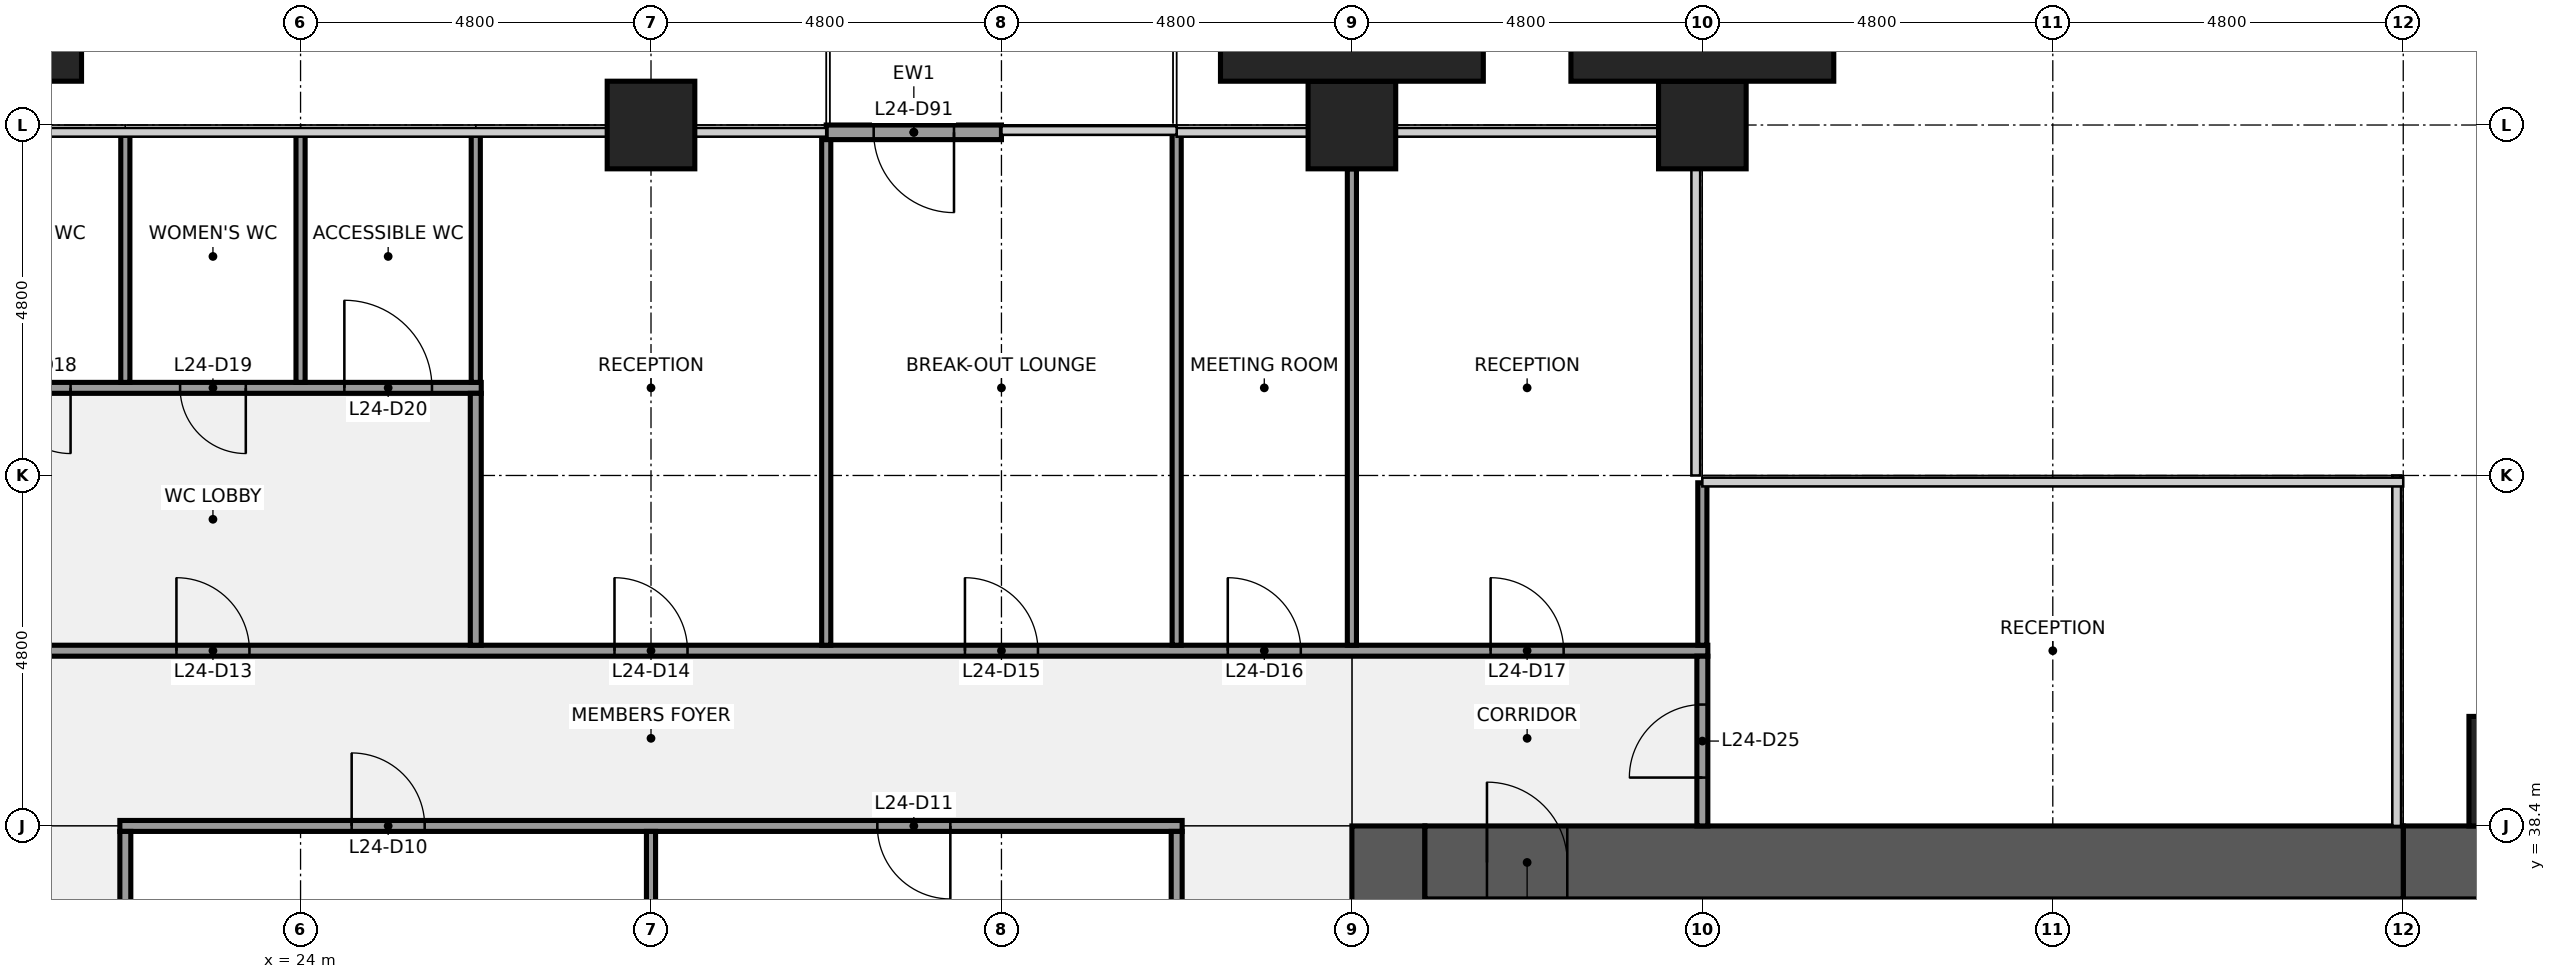
"""IFC4 building model, lengths in metres.
Left out: names, types, materials, properties, quantities, classifications, styles, units other than length and angle.
Written with IfcOpenShell. Run it as: python <this file> out.ifc"""

import sys

from ifc_helpers import new_model, si_unit, direction, frame, frame_2d, origin, origin_2d, place, context, subcontext, project, spatial, rectangle, extrude, element, fill, save


model = new_model("IFC4")
c1 = context("Model", 3, precision=1e-05, world=origin(), true_north=direction((0.0, 1.0)))
c2 = subcontext(c1, "Body", "Model", "MODEL_VIEW")
j1 = project(units=[si_unit("LENGTHUNIT", "METRE"), si_unit("PLANEANGLEUNIT", "RADIAN")], contexts=[c1])
p1 = place(None, origin())
s1 = spatial("IfcSite", under=j1, at=p1, CompositionType="ELEMENT")
p2 = place(p1, origin())
s2 = spatial("IfcBuilding", under=s1, at=p2, CompositionType="ELEMENT")
p3 = place(p2, frame((0.0, 0.0, 116.1)))
s3 = spatial("IfcBuildingStorey", under=s2, at=p3, CompositionType="ELEMENT", Elevation=116.1)
for number, where, z_axis, x_axis in (
    (1, (28.8, 48.0, 0.0), (0.0, 0.0, 1.0), (1.0, 0.0, 0.0)),
    (2, (38.4, 48.0, 0.0), (0.0, 0.0, 1.0), (1.0, 0.0, 0.0)),
    (3, (43.2, 48.0, 0.0), (0.0, 0.0, 1.0), (1.0, 0.0, 0.0)),
):
    element("IfcColumn", number, at=place(p3, frame(where, z_axis=z_axis, x_axis=x_axis)), inside=s3, PredefinedType="COLUMN", context=c2, shape_type="SweptSolid", body=[
        extrude(rectangle(XDim=1.2, YDim=1.2, at=origin_2d()), origin(), (0.0, 0.0, 1.0), 4.0),
    ])
p4 = place(p3, frame((38.9, 9.6, 0.0), z_axis=(0.0, 0.0, 1.0), x_axis=(0.0, 1.0, 0.0)))
e4 = element("IfcWall", 4, at=p4, inside=s3, PredefinedType="SHEAR", context=c2, shape_type="SweptSolid", body=[
    extrude(rectangle(XDim=28.8, YDim=1.0, at=frame_2d((14.4, 0.0))), origin(), (0.0, 0.0, 1.0), 3.84),
])
p5 = place(p4, frame((8.7, 0.0, 0.0)))
e5 = element("IfcOpeningElement", 5, at=p5, cuts=e4, PredefinedType="OPENING", context=c2, shape_type="SweptSolid", body=[
    extrude(rectangle(XDim=1.8, YDim=2.1, at=frame_2d((0.9, 1.05))), frame((0.0, 0.51, 0.0), z_axis=(0.0, -1.0, 0.0), x_axis=(1.0, 0.0, 0.0)), (0.0, 0.0, 1.0), 1.02),
])
p6 = place(p4, frame((18.3, 0.0, 0.0)))
e6 = element("IfcOpeningElement", 6, at=p6, cuts=e4, PredefinedType="OPENING", context=c2, shape_type="SweptSolid", body=[
    extrude(rectangle(XDim=1.8, YDim=2.1, at=frame_2d((0.9, 1.05))), frame((0.0, 0.51, 0.0), z_axis=(0.0, -1.0, 0.0), x_axis=(1.0, 0.0, 0.0)), (0.0, 0.0, 1.0), 1.02),
])
p7 = place(p3, frame((43.85, 37.3, 0.0), z_axis=(0.0, 0.0, 1.0), x_axis=(1.0, 0.0, 0.0)))
e7 = element("IfcWall", 7, at=p7, inside=s3, PredefinedType="SHEAR", context=c2, shape_type="SweptSolid", body=[
    extrude(rectangle(XDim=7.5, YDim=0.2, at=frame_2d((3.75, 0.0))), origin(), (0.0, 0.0, 1.0), 3.84),
])
p8 = place(p3, frame((52.8, 37.9, 0.0), z_axis=(0.0, 0.0, 1.0), x_axis=(1.0, 0.0, 0.0)))
e8 = element("IfcWall", 8, at=p8, inside=s3, PredefinedType="SHEAR", context=c2, shape_type="SweptSolid", body=[
    extrude(rectangle(XDim=3.8, YDim=1.0, at=frame_2d((1.9, 0.0))), origin(), (0.0, 0.0, 1.0), 3.84),
])
p9 = place(p3, frame((39.4, 37.9, 0.0), z_axis=(0.0, 0.0, 1.0), x_axis=(1.0, 0.0, 0.0)))
e9 = element("IfcWall", 9, at=p9, inside=s3, PredefinedType="SHEAR", context=c2, shape_type="SweptSolid", body=[
    extrude(rectangle(XDim=13.4, YDim=1.0, at=frame_2d((6.7, 0.0))), origin(), (0.0, 0.0, 1.0), 3.84),
])
p10 = place(p9, frame((0.85, 0.0, 0.0)))
e10 = element("IfcOpeningElement", 10, at=p10, cuts=e9, PredefinedType="OPENING", context=c2, shape_type="SweptSolid", body=[
    extrude(rectangle(XDim=1.1, YDim=2.1, at=frame_2d((0.55, 1.05))), frame((0.0, 0.51, 0.0), z_axis=(0.0, -1.0, 0.0), x_axis=(1.0, 0.0, 0.0)), (0.0, 0.0, 1.0), 1.02),
])
p11 = place(p3, frame((21.525, 38.4, 0.0), z_axis=(0.0, 0.0, 1.0), x_axis=(1.0, 0.0, 0.0)))
e11 = element("IfcWall", 11, at=p11, inside=s3, PredefinedType="PARTITIONING", context=c2, shape_type="SweptSolid", body=[
    extrude(rectangle(XDim=14.55, YDim=0.15, at=frame_2d((7.275, 0.0))), origin(), (0.0, 0.0, 1.0), 2.936),
])
p12 = place(p11, frame((3.175, 0.0, 0.0)))
e12 = element("IfcOpeningElement", 12, at=p12, cuts=e11, PredefinedType="OPENING", context=c2, shape_type="SweptSolid", body=[
    extrude(rectangle(XDim=1.0, YDim=2.1, at=frame_2d((0.5, 1.05))), frame((0.0, 0.085, 0.0), z_axis=(0.0, -1.0, 0.0), x_axis=(1.0, 0.0, 0.0)), (0.0, 0.0, 1.0), 0.17),
])
p13 = place(p11, frame((10.375, 0.0, 0.0)))
e13 = element("IfcOpeningElement", 13, at=p13, cuts=e11, PredefinedType="OPENING", context=c2, shape_type="SweptSolid", body=[
    extrude(rectangle(XDim=1.0, YDim=2.1, at=frame_2d((0.5, 1.05))), frame((0.0, 0.085, 0.0), z_axis=(0.0, -1.0, 0.0), x_axis=(1.0, 0.0, 0.0)), (0.0, 0.0, 1.0), 0.17),
])
p14 = place(p3, frame((14.325, 40.8, 0.0), z_axis=(0.0, 0.0, 1.0), x_axis=(1.0, 0.0, 0.0)))
e14 = element("IfcWall", 14, at=p14, inside=s3, PredefinedType="PARTITIONING", context=c2, shape_type="SweptSolid", body=[
    extrude(rectangle(XDim=28.95, YDim=0.15, at=frame_2d((14.475, 0.0))), origin(), (0.0, 0.0, 1.0), 2.936),
])
p15 = place(p14, frame((2.575, 0.0, 0.0)))
e15 = element("IfcOpeningElement", 15, at=p15, cuts=e14, PredefinedType="OPENING", context=c2, shape_type="SweptSolid", body=[
    extrude(rectangle(XDim=1.0, YDim=2.1, at=frame_2d((0.5, 1.05))), frame((0.0, 0.085, 0.0), z_axis=(0.0, -1.0, 0.0), x_axis=(1.0, 0.0, 0.0)), (0.0, 0.0, 1.0), 0.17),
])
p16 = place(p14, frame((7.975, 0.0, 0.0)))
e16 = element("IfcOpeningElement", 16, at=p16, cuts=e14, PredefinedType="OPENING", context=c2, shape_type="SweptSolid", body=[
    extrude(rectangle(XDim=1.0, YDim=2.1, at=frame_2d((0.5, 1.05))), frame((0.0, 0.085, 0.0), z_axis=(0.0, -1.0, 0.0), x_axis=(1.0, 0.0, 0.0)), (0.0, 0.0, 1.0), 0.17),
])
p17 = place(p14, frame((13.975, 0.0, 0.0)))
e17 = element("IfcOpeningElement", 17, at=p17, cuts=e14, PredefinedType="OPENING", context=c2, shape_type="SweptSolid", body=[
    extrude(rectangle(XDim=1.0, YDim=2.1, at=frame_2d((0.5, 1.05))), frame((0.0, 0.085, 0.0), z_axis=(0.0, -1.0, 0.0), x_axis=(1.0, 0.0, 0.0)), (0.0, 0.0, 1.0), 0.17),
])
p18 = place(p14, frame((18.775, 0.0, 0.0)))
e18 = element("IfcOpeningElement", 18, at=p18, cuts=e14, PredefinedType="OPENING", context=c2, shape_type="SweptSolid", body=[
    extrude(rectangle(XDim=1.0, YDim=2.1, at=frame_2d((0.5, 1.05))), frame((0.0, 0.085, 0.0), z_axis=(0.0, -1.0, 0.0), x_axis=(1.0, 0.0, 0.0)), (0.0, 0.0, 1.0), 0.17),
])
p19 = place(p14, frame((22.375, 0.0, 0.0)))
e19 = element("IfcOpeningElement", 19, at=p19, cuts=e14, PredefinedType="OPENING", context=c2, shape_type="SweptSolid", body=[
    extrude(rectangle(XDim=1.0, YDim=2.1, at=frame_2d((0.5, 1.05))), frame((0.0, 0.085, 0.0), z_axis=(0.0, -1.0, 0.0), x_axis=(1.0, 0.0, 0.0)), (0.0, 0.0, 1.0), 0.17),
])
p20 = place(p14, frame((25.975, 0.0, 0.0)))
e20 = element("IfcOpeningElement", 20, at=p20, cuts=e14, PredefinedType="OPENING", context=c2, shape_type="SweptSolid", body=[
    extrude(rectangle(XDim=1.0, YDim=2.1, at=frame_2d((0.5, 1.05))), frame((0.0, 0.085, 0.0), z_axis=(0.0, -1.0, 0.0), x_axis=(1.0, 0.0, 0.0)), (0.0, 0.0, 1.0), 0.17),
])
p21 = place(p3, frame((19.125, 44.4, 0.0), z_axis=(0.0, 0.0, 1.0), x_axis=(1.0, 0.0, 0.0)))
e21 = element("IfcWall", 21, at=p21, inside=s3, PredefinedType="PARTITIONING", context=c2, shape_type="SweptSolid", body=[
    extrude(rectangle(XDim=7.35, YDim=0.15, at=frame_2d((3.675, 0.0))), origin(), (0.0, 0.0, 1.0), 2.936),
])
p22 = place(p21, frame((0.825, 0.0, 0.0)))
e22 = element("IfcOpeningElement", 22, at=p22, cuts=e21, PredefinedType="OPENING", context=c2, shape_type="SweptSolid", body=[
    extrude(rectangle(XDim=0.9, YDim=2.1, at=frame_2d((0.45, 1.05))), frame((0.0, 0.085, 0.0), z_axis=(0.0, -1.0, 0.0), x_axis=(1.0, 0.0, 0.0)), (0.0, 0.0, 1.0), 0.17),
])
p23 = place(p21, frame((3.225, 0.0, 0.0)))
e23 = element("IfcOpeningElement", 23, at=p23, cuts=e21, PredefinedType="OPENING", context=c2, shape_type="SweptSolid", body=[
    extrude(rectangle(XDim=0.9, YDim=2.1, at=frame_2d((0.45, 1.05))), frame((0.0, 0.085, 0.0), z_axis=(0.0, -1.0, 0.0), x_axis=(1.0, 0.0, 0.0)), (0.0, 0.0, 1.0), 0.17),
])
p24 = place(p21, frame((5.475, 0.0, 0.0)))
e24 = element("IfcOpeningElement", 24, at=p24, cuts=e21, PredefinedType="OPENING", context=c2, shape_type="SweptSolid", body=[
    extrude(rectangle(XDim=1.2, YDim=2.1, at=frame_2d((0.6, 1.05))), frame((0.0, 0.085, 0.0), z_axis=(0.0, -1.0, 0.0), x_axis=(1.0, 0.0, 0.0)), (0.0, 0.0, 1.0), 0.17),
])
p25 = place(p3, frame((21.6, 44.475, 0.0), z_axis=(0.0, 0.0, 1.0), x_axis=(0.0, 1.0, 0.0)))
e25 = element("IfcWall", 25, at=p25, inside=s3, PredefinedType="PARTITIONING", context=c2, shape_type="SweptSolid", body=[
    extrude(rectangle(XDim=3.425, YDim=0.125, at=frame_2d((1.712, 0.0))), origin(), (0.0, 0.0, 1.0), 2.936),
])
p26 = place(p3, frame((21.6, 33.675, 0.0), z_axis=(0.0, 0.0, 1.0), x_axis=(0.0, 1.0, 0.0)))
e26 = element("IfcWall", 26, at=p26, inside=s3, PredefinedType="PARTITIONING", context=c2, shape_type="SweptSolid", body=[
    extrude(rectangle(XDim=4.65, YDim=0.15, at=frame_2d((2.325, 0.0))), origin(), (0.0, 0.0, 1.0), 2.936),
])
for number, where, z_axis, x_axis in (
    (27, (24.0, 44.475, 0.0), (0.0, 0.0, 1.0), (0.0, 1.0, 0.0)),
    (28, (26.4, 44.475, 0.0), (0.0, 0.0, 1.0), (0.0, 1.0, 0.0)),
):
    element("IfcWall", number, at=place(p3, frame(where, z_axis=z_axis, x_axis=x_axis)), inside=s3, PredefinedType="PARTITIONING", context=c2, shape_type="SweptSolid", body=[
        extrude(rectangle(XDim=3.425, YDim=0.125, at=frame_2d((1.712, 0.0))), origin(), (0.0, 0.0, 1.0), 2.936),
    ])
p27 = place(p3, frame((26.4, 40.875, 0.0), z_axis=(0.0, 0.0, 1.0), x_axis=(0.0, 1.0, 0.0)))
e29 = element("IfcWall", 29, at=p27, inside=s3, PredefinedType="PARTITIONING", context=c2, shape_type="SweptSolid", body=[
    extrude(rectangle(XDim=3.45, YDim=0.15, at=frame_2d((1.725, 0.0))), origin(), (0.0, 0.0, 1.0), 2.936),
])
p28 = place(p3, frame((28.8, 33.663, 0.0), z_axis=(0.0, 0.0, 1.0), x_axis=(0.0, 1.0, 0.0)))
e30 = element("IfcWall", 30, at=p28, inside=s3, PredefinedType="PARTITIONING", context=c2, shape_type="SweptSolid", body=[
    extrude(rectangle(XDim=4.662, YDim=0.125, at=frame_2d((2.331, 0.0))), origin(), (0.0, 0.0, 1.0), 2.936),
])
for number, where, z_axis, x_axis in (
    (31, (31.2, 40.875, 0.0), (0.0, 0.0, 1.0), (0.0, 1.0, 0.0)),
    (32, (36.0, 40.875, 0.0), (0.0, 0.0, 1.0), (0.0, 1.0, 0.0)),
):
    element("IfcWall", number, at=place(p3, frame(where, z_axis=z_axis, x_axis=x_axis)), inside=s3, PredefinedType="PARTITIONING", context=c2, shape_type="SweptSolid", body=[
        extrude(rectangle(XDim=7.025, YDim=0.125, at=frame_2d((3.512, 0.0))), origin(), (0.0, 0.0, 1.0), 2.936),
    ])
p29 = place(p3, frame((36.0, 33.675, 0.0), z_axis=(0.0, 0.0, 1.0), x_axis=(0.0, 1.0, 0.0)))
e33 = element("IfcWall", 33, at=p29, inside=s3, PredefinedType="PARTITIONING", context=c2, shape_type="SweptSolid", body=[
    extrude(rectangle(XDim=4.65, YDim=0.15, at=frame_2d((2.325, 0.0))), origin(), (0.0, 0.0, 1.0), 2.936),
])
p30 = place(p3, frame((38.4, 40.875, 0.0), z_axis=(0.0, 0.0, 1.0), x_axis=(0.0, 1.0, 0.0)))
e34 = element("IfcWall", 34, at=p30, inside=s3, PredefinedType="PARTITIONING", context=c2, shape_type="SweptSolid", body=[
    extrude(rectangle(XDim=6.525, YDim=0.125, at=frame_2d((3.262, 0.0))), origin(), (0.0, 0.0, 1.0), 2.936),
])
p31 = place(p3, frame((43.2, 40.875, 0.0), z_axis=(0.0, 0.0, 1.0), x_axis=(0.0, 1.0, 0.0)))
e35 = element("IfcWall", 35, at=p31, inside=s3, PredefinedType="PARTITIONING", context=c2, shape_type="SweptSolid", body=[
    extrude(rectangle(XDim=2.225, YDim=0.125, at=frame_2d((1.113, 0.0))), origin(), (0.0, 0.0, 1.0), 2.936),
])
p32 = place(p3, frame((43.2, 38.4, 0.0), z_axis=(0.0, 0.0, 1.0), x_axis=(0.0, 1.0, 0.0)))
e36 = element("IfcWall", 36, at=p32, inside=s3, PredefinedType="PARTITIONING", context=c2, shape_type="SweptSolid", body=[
    extrude(rectangle(XDim=2.325, YDim=0.15, at=frame_2d((1.163, 0.0))), origin(), (0.0, 0.0, 1.0), 2.936),
])
p33 = place(p32, frame((0.663, 0.0, 0.0)))
e37 = element("IfcOpeningElement", 37, at=p33, cuts=e36, PredefinedType="OPENING", context=c2, shape_type="SweptSolid", body=[
    extrude(rectangle(XDim=1.0, YDim=2.1, at=frame_2d((0.5, 1.05))), frame((0.0, 0.085, 0.0), z_axis=(0.0, -1.0, 0.0), x_axis=(1.0, 0.0, 0.0)), (0.0, 0.0, 1.0), 0.17),
])
p34 = place(p3, frame((55.2, 39.15, 0.0), z_axis=(0.0, 0.0, 1.0), x_axis=(1.0, 0.0, 0.0)))
e38 = element("IfcColumn", 38, at=p34, inside=s3, PredefinedType="PILASTER", context=c2, shape_type="SweptSolid", body=[
    extrude(rectangle(XDim=3.0, YDim=1.5, at=origin_2d()), origin(), (0.0, 0.0, 1.0), 4.0),
])
p35 = place(p3, frame((33.6, 47.9, 0.0), z_axis=(0.0, 0.0, 1.0), x_axis=(-1.0, 0.0, 0.0)))
e39 = element("IfcWall", 39, at=p35, inside=s3, PredefinedType="SOLIDWALL", context=c2, shape_type="SweptSolid", body=[
    extrude(rectangle(XDim=2.4, YDim=0.2, at=frame_2d((1.2, 0.0))), origin(), (0.0, 0.0, 1.0), 3.314),
])
p36 = place(p35, frame((0.65, 0.0, 0.0)))
e40 = element("IfcOpeningElement", 40, at=p36, cuts=e39, PredefinedType="OPENING", context=c2, shape_type="SweptSolid", body=[
    extrude(rectangle(XDim=1.1, YDim=2.1, at=frame_2d((0.55, 1.05))), frame((0.0, 0.11, 0.0), z_axis=(0.0, -1.0, 0.0), x_axis=(1.0, 0.0, 0.0)), (0.0, 0.0, 1.0), 0.22),
])
for number, where, z_axis, x_axis in (
    (41, (19.2, 49.05, 0.0), (0.0, 0.0, 1.0), (1.0, 0.0, 0.0)),
    (42, (38.4, 49.05, 0.0), (0.0, 0.0, 1.0), (1.0, 0.0, 0.0)),
    (43, (43.2, 49.05, 0.0), (0.0, 0.0, 1.0), (1.0, 0.0, 0.0)),
):
    element("IfcColumn", number, at=place(p3, frame(where, z_axis=z_axis, x_axis=x_axis)), inside=s3, PredefinedType="PILASTER", context=c2, shape_type="SweptSolid", body=[
        extrude(rectangle(XDim=3.6, YDim=0.9, at=origin_2d()), origin(), (0.0, 0.0, 1.0), 4.0),
    ])
p37 = place(p10, origin())
e44 = element("IfcDoor", 44, at=p37, inside=s3, OperationType="SINGLE_SWING_LEFT", PredefinedType="DOOR", context=c2, shape_type="SweptSolid", body=[
    extrude(rectangle(XDim=1.1, YDim=2.1, at=frame_2d((0.55, 1.05))), frame((0.0, 0.025, 0.0), z_axis=(0.0, -1.0, 0.0), x_axis=(1.0, 0.0, 0.0)), (0.0, 0.0, 1.0), 0.05),
])
fill(e10, e44)
p38 = place(p12, origin())
e45 = element("IfcDoor", 45, at=p38, inside=s3, OperationType="SINGLE_SWING_LEFT", PredefinedType="DOOR", context=c2, shape_type="SweptSolid", body=[
    extrude(rectangle(XDim=1.0, YDim=2.1, at=frame_2d((0.5, 1.05))), frame((0.0, 0.025, 0.0), z_axis=(0.0, -1.0, 0.0), x_axis=(1.0, 0.0, 0.0)), (0.0, 0.0, 1.0), 0.05),
])
fill(e12, e45)
p39 = place(p13, origin())
e46 = element("IfcDoor", 46, at=p39, inside=s3, OperationType="SINGLE_SWING_RIGHT", PredefinedType="DOOR", context=c2, shape_type="SweptSolid", body=[
    extrude(rectangle(XDim=1.0, YDim=2.1, at=frame_2d((0.5, 1.05))), frame((0.0, 0.025, 0.0), z_axis=(0.0, -1.0, 0.0), x_axis=(1.0, 0.0, 0.0)), (0.0, 0.0, 1.0), 0.05),
])
fill(e13, e46)
p40 = place(p16, origin())
e47 = element("IfcDoor", 47, at=p40, inside=s3, OperationType="SINGLE_SWING_LEFT", PredefinedType="DOOR", context=c2, shape_type="SweptSolid", body=[
    extrude(rectangle(XDim=1.0, YDim=2.1, at=frame_2d((0.5, 1.05))), frame((0.0, 0.025, 0.0), z_axis=(0.0, -1.0, 0.0), x_axis=(1.0, 0.0, 0.0)), (0.0, 0.0, 1.0), 0.05),
])
fill(e16, e47)
p41 = place(p17, origin())
e48 = element("IfcDoor", 48, at=p41, inside=s3, OperationType="SINGLE_SWING_LEFT", PredefinedType="DOOR", context=c2, shape_type="SweptSolid", body=[
    extrude(rectangle(XDim=1.0, YDim=2.1, at=frame_2d((0.5, 1.05))), frame((0.0, 0.025, 0.0), z_axis=(0.0, -1.0, 0.0), x_axis=(1.0, 0.0, 0.0)), (0.0, 0.0, 1.0), 0.05),
])
fill(e17, e48)
p42 = place(p18, origin())
e49 = element("IfcDoor", 49, at=p42, inside=s3, OperationType="SINGLE_SWING_LEFT", PredefinedType="DOOR", context=c2, shape_type="SweptSolid", body=[
    extrude(rectangle(XDim=1.0, YDim=2.1, at=frame_2d((0.5, 1.05))), frame((0.0, 0.025, 0.0), z_axis=(0.0, -1.0, 0.0), x_axis=(1.0, 0.0, 0.0)), (0.0, 0.0, 1.0), 0.05),
])
fill(e18, e49)
p43 = place(p19, origin())
e50 = element("IfcDoor", 50, at=p43, inside=s3, OperationType="SINGLE_SWING_LEFT", PredefinedType="DOOR", context=c2, shape_type="SweptSolid", body=[
    extrude(rectangle(XDim=1.0, YDim=2.1, at=frame_2d((0.5, 1.05))), frame((0.0, 0.025, 0.0), z_axis=(0.0, -1.0, 0.0), x_axis=(1.0, 0.0, 0.0)), (0.0, 0.0, 1.0), 0.05),
])
fill(e19, e50)
p44 = place(p20, origin())
e51 = element("IfcDoor", 51, at=p44, inside=s3, OperationType="SINGLE_SWING_LEFT", PredefinedType="DOOR", context=c2, shape_type="SweptSolid", body=[
    extrude(rectangle(XDim=1.0, YDim=2.1, at=frame_2d((0.5, 1.05))), frame((0.0, 0.025, 0.0), z_axis=(0.0, -1.0, 0.0), x_axis=(1.0, 0.0, 0.0)), (0.0, 0.0, 1.0), 0.05),
])
fill(e20, e51)
p45 = place(p22, origin())
e52 = element("IfcDoor", 52, at=p45, inside=s3, OperationType="SINGLE_SWING_RIGHT", PredefinedType="DOOR", context=c2, shape_type="SweptSolid", body=[
    extrude(rectangle(XDim=0.9, YDim=2.1, at=frame_2d((0.45, 1.05))), frame((0.0, 0.025, 0.0), z_axis=(0.0, -1.0, 0.0), x_axis=(1.0, 0.0, 0.0)), (0.0, 0.0, 1.0), 0.05),
])
fill(e22, e52)
p46 = place(p23, origin())
e53 = element("IfcDoor", 53, at=p46, inside=s3, OperationType="SINGLE_SWING_RIGHT", PredefinedType="DOOR", context=c2, shape_type="SweptSolid", body=[
    extrude(rectangle(XDim=0.9, YDim=2.1, at=frame_2d((0.45, 1.05))), frame((0.0, 0.025, 0.0), z_axis=(0.0, -1.0, 0.0), x_axis=(1.0, 0.0, 0.0)), (0.0, 0.0, 1.0), 0.05),
])
fill(e23, e53)
p47 = place(p24, origin())
e54 = element("IfcDoor", 54, at=p47, inside=s3, OperationType="SINGLE_SWING_LEFT", PredefinedType="DOOR", context=c2, shape_type="SweptSolid", body=[
    extrude(rectangle(XDim=1.2, YDim=2.1, at=frame_2d((0.6, 1.05))), frame((0.0, 0.025, 0.0), z_axis=(0.0, -1.0, 0.0), x_axis=(1.0, 0.0, 0.0)), (0.0, 0.0, 1.0), 0.05),
])
fill(e24, e54)
p48 = place(p33, origin())
e55 = element("IfcDoor", 55, at=p48, inside=s3, OperationType="SINGLE_SWING_LEFT", PredefinedType="DOOR", context=c2, shape_type="SweptSolid", body=[
    extrude(rectangle(XDim=1.0, YDim=2.1, at=frame_2d((0.5, 1.05))), frame((0.0, 0.025, 0.0), z_axis=(0.0, -1.0, 0.0), x_axis=(1.0, 0.0, 0.0)), (0.0, 0.0, 1.0), 0.05),
])
fill(e37, e55)
p49 = place(p36, origin())
e56 = element("IfcDoor", 56, at=p49, inside=s3, OperationType="SINGLE_SWING_LEFT", PredefinedType="DOOR", context=c2, shape_type="SweptSolid", body=[
    extrude(rectangle(XDim=1.1, YDim=2.1, at=frame_2d((0.55, 1.05))), frame((0.0, 0.025, 0.0), z_axis=(0.0, -1.0, 0.0), x_axis=(1.0, 0.0, 0.0)), (0.0, 0.0, 1.0), 0.05),
])
fill(e40, e56)
save(model, sys.argv[1])
